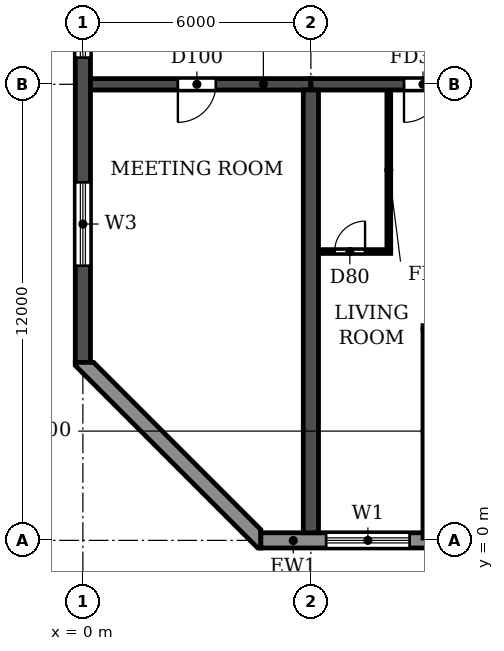
"""IFC4 building model, lengths in metres.
Left out: names, types, materials, properties, quantities, classifications, styles, units other than length and angle.
Written with IfcOpenShell. Run it as: python <this file> out.ifc"""

import sys

from ifc_helpers import new_model, si_unit, direction, frame, frame_2d, origin, place, context, subcontext, project, spatial, polyline, rectangle, outline, extrude, element, fill, save


model = new_model("IFC4")
c1 = context("Model", 3, precision=1e-05, world=origin(), true_north=direction((0.0, 1.0)))
c2 = subcontext(c1, "Body", "Model", "MODEL_VIEW")
j1 = project(units=[si_unit("LENGTHUNIT", "METRE"), si_unit("PLANEANGLEUNIT", "RADIAN")], contexts=[c1])
p1 = place(None, origin())
s1 = spatial("IfcSite", under=j1, at=p1, CompositionType="ELEMENT")
p2 = place(p1, origin())
s2 = spatial("IfcBuilding", under=s1, at=p2, CompositionType="ELEMENT")
p3 = place(p2, frame((0.0, 0.0, 26.7)))
s3 = spatial("IfcBuildingStorey", under=s2, at=p3, CompositionType="ELEMENT", Elevation=26.7)
p4 = place(p3, frame((6.0, 0.2, 0.0), z_axis=(0.0, 0.0, 1.0), x_axis=(0.0, 1.0, 0.0)))
e1 = element("IfcWall", 1, at=p4, inside=s3, PredefinedType="SHEAR", context=c2, shape_type="SweptSolid", body=[
    extrude(rectangle(XDim=11.65, YDim=0.4, at=frame_2d((5.825, 0.0))), origin(), (0.0, 0.0, 1.0), 3.05),
])
p5 = place(p3, frame((0.0, 4.683, 0.0), z_axis=(0.0, 0.0, 1.0), x_axis=(0.0, 1.0, 0.0)))
e2 = element("IfcWall", 2, at=p5, inside=s3, PredefinedType="SHEAR", context=c2, shape_type="SweptSolid", body=[
    extrude(rectangle(XDim=35.434, YDim=0.4, at=frame_2d((17.717, 0.0))), origin(), (0.0, 0.0, 1.0), 3.05),
])
p6 = place(p5, frame((23.817, 0.0, 0.9)))
e3 = element("IfcOpeningElement", 3, at=p6, cuts=e2, PredefinedType="OPENING", context=c2, shape_type="SweptSolid", body=[
    extrude(rectangle(XDim=1.2, YDim=1.5, at=frame_2d((0.6, 0.75))), frame((0.0, 0.21, 0.0), z_axis=(0.0, -1.0, 0.0), x_axis=(1.0, 0.0, 0.0)), (0.0, 0.0, 1.0), 0.42),
])
p7 = place(p5, frame((8.017, 0.0, 0.9)))
e4 = element("IfcOpeningElement", 4, at=p7, cuts=e2, PredefinedType="OPENING", context=c2, shape_type="SweptSolid", body=[
    extrude(rectangle(XDim=1.2, YDim=1.5, at=frame_2d((0.6, 0.75))), frame((0.0, 0.21, 0.0), z_axis=(0.0, -1.0, 0.0), x_axis=(1.0, 0.0, 0.0)), (0.0, 0.0, 1.0), 0.42),
])
p8 = place(p5, frame((15.917, 0.0, 0.9)))
e5 = element("IfcOpeningElement", 5, at=p8, cuts=e2, PredefinedType="OPENING", context=c2, shape_type="SweptSolid", body=[
    extrude(rectangle(XDim=1.2, YDim=1.5, at=frame_2d((0.6, 0.75))), frame((0.0, 0.21, 0.0), z_axis=(0.0, -1.0, 0.0), x_axis=(1.0, 0.0, 0.0)), (0.0, 0.0, 1.0), 0.42),
])
p9 = place(p5, frame((29.493, 0.0, 0.6)))
e6 = element("IfcOpeningElement", 6, at=p9, cuts=e2, PredefinedType="OPENING", context=c2, shape_type="SweptSolid", body=[
    extrude(rectangle(XDim=2.2, YDim=1.8, at=frame_2d((1.1, 0.9))), frame((0.0, 0.21, 0.0), z_axis=(0.0, -1.0, 0.0), x_axis=(1.0, 0.0, 0.0)), (0.0, 0.0, 1.0), 0.42),
])
p10 = place(p5, frame((2.541, 0.0, 0.6)))
e7 = element("IfcOpeningElement", 7, at=p10, cuts=e2, PredefinedType="OPENING", context=c2, shape_type="SweptSolid", body=[
    extrude(rectangle(XDim=2.2, YDim=1.8, at=frame_2d((1.1, 0.9))), frame((0.0, 0.21, 0.0), z_axis=(0.0, -1.0, 0.0), x_axis=(1.0, 0.0, 0.0)), (0.0, 0.0, 1.0), 0.42),
])
p11 = place(p3, frame((0.2, 12.0, 0.0), z_axis=(0.0, 0.0, 1.0), x_axis=(1.0, 0.0, 0.0)))
e8 = element("IfcWall", 8, at=p11, inside=s3, PredefinedType="SHEAR", context=c2, shape_type="SweptSolid", body=[
    extrude(rectangle(XDim=5.8, YDim=0.3, at=frame_2d((2.9, 0.0))), origin(), (0.0, 0.0, 1.0), 2.45),
])
p12 = place(p11, frame((2.3, 0.0, 0.0)))
e9 = element("IfcOpeningElement", 9, at=p12, cuts=e8, PredefinedType="OPENING", context=c2, shape_type="SweptSolid", body=[
    extrude(rectangle(XDim=1.0, YDim=2.1, at=frame_2d((0.5, 1.05))), frame((0.0, 0.16, 0.0), z_axis=(0.0, -1.0, 0.0), x_axis=(1.0, 0.0, 0.0)), (0.0, 0.0, 1.0), 0.32),
])
p13 = place(p3, frame((6.0, 12.0, 0.0), z_axis=(0.0, 0.0, 1.0), x_axis=(1.0, 0.0, 0.0)))
e10 = element("IfcWall", 10, at=p13, inside=s3, PredefinedType="SHEAR", context=c2, shape_type="SweptSolid", body=[
    extrude(rectangle(XDim=6.0, YDim=0.3, at=frame_2d((3.0, 0.0))), origin(), (0.0, 0.0, 1.0), 2.45),
])
p14 = place(p13, frame((2.45, 0.0, 0.0)))
e11 = element("IfcOpeningElement", 11, at=p14, cuts=e10, PredefinedType="OPENING", context=c2, shape_type="SweptSolid", body=[
    extrude(rectangle(XDim=1.0, YDim=2.1, at=frame_2d((0.5, 1.05))), frame((0.0, 0.16, 0.0), z_axis=(0.0, -1.0, 0.0), x_axis=(1.0, 0.0, 0.0)), (0.0, 0.0, 1.0), 0.32),
])
p15 = place(p3, frame((4.683, 0.0, 0.0), z_axis=(0.0, 0.0, 1.0), x_axis=(1.0, 0.0, 0.0)))
e12 = element("IfcWall", 12, at=p15, inside=s3, PredefinedType="STANDARD", context=c2, shape_type="SweptSolid", body=[
    extrude(rectangle(XDim=92.634, YDim=0.4, at=frame_2d((46.317, 0.0))), origin(), (0.0, 0.0, 1.0), 3.05),
])
p16 = place(p15, frame((1.717, 0.0, 0.9)))
e13 = element("IfcOpeningElement", 13, at=p16, cuts=e12, PredefinedType="OPENING", context=c2, shape_type="SweptSolid", body=[
    extrude(rectangle(XDim=2.2, YDim=1.5, at=frame_2d((1.1, 0.75))), frame((0.0, 0.21, 0.0), z_axis=(0.0, -1.0, 0.0), x_axis=(1.0, 0.0, 0.0)), (0.0, 0.0, 1.0), 0.42),
])
p17 = place(p15, frame((4.717, 0.0, 0.9)))
e14 = element("IfcOpeningElement", 14, at=p17, cuts=e12, PredefinedType="OPENING", context=c2, shape_type="SweptSolid", body=[
    extrude(rectangle(XDim=2.2, YDim=1.5, at=frame_2d((1.1, 0.75))), frame((0.0, 0.21, 0.0), z_axis=(0.0, -1.0, 0.0), x_axis=(1.0, 0.0, 0.0)), (0.0, 0.0, 1.0), 0.42),
])
p18 = place(p15, frame((7.717, 0.0, 0.9)))
e15 = element("IfcOpeningElement", 15, at=p18, cuts=e12, PredefinedType="OPENING", context=c2, shape_type="SweptSolid", body=[
    extrude(rectangle(XDim=2.2, YDim=1.5, at=frame_2d((1.1, 0.75))), frame((0.0, 0.21, 0.0), z_axis=(0.0, -1.0, 0.0), x_axis=(1.0, 0.0, 0.0)), (0.0, 0.0, 1.0), 0.42),
])
p19 = place(p15, frame((10.717, 0.0, 0.9)))
e16 = element("IfcOpeningElement", 16, at=p19, cuts=e12, PredefinedType="OPENING", context=c2, shape_type="SweptSolid", body=[
    extrude(rectangle(XDim=2.2, YDim=1.5, at=frame_2d((1.1, 0.75))), frame((0.0, 0.21, 0.0), z_axis=(0.0, -1.0, 0.0), x_axis=(1.0, 0.0, 0.0)), (0.0, 0.0, 1.0), 0.42),
])
p20 = place(p15, frame((13.717, 0.0, 0.9)))
e17 = element("IfcOpeningElement", 17, at=p20, cuts=e12, PredefinedType="OPENING", context=c2, shape_type="SweptSolid", body=[
    extrude(rectangle(XDim=2.2, YDim=1.5, at=frame_2d((1.1, 0.75))), frame((0.0, 0.21, 0.0), z_axis=(0.0, -1.0, 0.0), x_axis=(1.0, 0.0, 0.0)), (0.0, 0.0, 1.0), 0.42),
])
p21 = place(p15, frame((16.717, 0.0, 0.9)))
e18 = element("IfcOpeningElement", 18, at=p21, cuts=e12, PredefinedType="OPENING", context=c2, shape_type="SweptSolid", body=[
    extrude(rectangle(XDim=2.2, YDim=1.5, at=frame_2d((1.1, 0.75))), frame((0.0, 0.21, 0.0), z_axis=(0.0, -1.0, 0.0), x_axis=(1.0, 0.0, 0.0)), (0.0, 0.0, 1.0), 0.42),
])
p22 = place(p15, frame((19.917, 0.0, 0.0)))
e19 = element("IfcOpeningElement", 19, at=p22, cuts=e12, PredefinedType="OPENING", context=c2, shape_type="SweptSolid", body=[
    extrude(rectangle(XDim=1.8, YDim=2.4, at=frame_2d((0.9, 1.2))), frame((0.0, 0.21, 0.0), z_axis=(0.0, -1.0, 0.0), x_axis=(1.0, 0.0, 0.0)), (0.0, 0.0, 1.0), 0.42),
])
p23 = place(p15, frame((22.717, 0.0, 0.9)))
e20 = element("IfcOpeningElement", 20, at=p23, cuts=e12, PredefinedType="OPENING", context=c2, shape_type="SweptSolid", body=[
    extrude(rectangle(XDim=2.2, YDim=1.5, at=frame_2d((1.1, 0.75))), frame((0.0, 0.21, 0.0), z_axis=(0.0, -1.0, 0.0), x_axis=(1.0, 0.0, 0.0)), (0.0, 0.0, 1.0), 0.42),
])
p24 = place(p15, frame((25.717, 0.0, 0.9)))
e21 = element("IfcOpeningElement", 21, at=p24, cuts=e12, PredefinedType="OPENING", context=c2, shape_type="SweptSolid", body=[
    extrude(rectangle(XDim=2.2, YDim=1.5, at=frame_2d((1.1, 0.75))), frame((0.0, 0.21, 0.0), z_axis=(0.0, -1.0, 0.0), x_axis=(1.0, 0.0, 0.0)), (0.0, 0.0, 1.0), 0.42),
])
p25 = place(p15, frame((28.717, 0.0, 0.9)))
e22 = element("IfcOpeningElement", 22, at=p25, cuts=e12, PredefinedType="OPENING", context=c2, shape_type="SweptSolid", body=[
    extrude(rectangle(XDim=2.2, YDim=1.5, at=frame_2d((1.1, 0.75))), frame((0.0, 0.21, 0.0), z_axis=(0.0, -1.0, 0.0), x_axis=(1.0, 0.0, 0.0)), (0.0, 0.0, 1.0), 0.42),
])
p26 = place(p15, frame((31.917, 0.0, 0.0)))
e23 = element("IfcOpeningElement", 23, at=p26, cuts=e12, PredefinedType="OPENING", context=c2, shape_type="SweptSolid", body=[
    extrude(rectangle(XDim=1.8, YDim=2.4, at=frame_2d((0.9, 1.2))), frame((0.0, 0.21, 0.0), z_axis=(0.0, -1.0, 0.0), x_axis=(1.0, 0.0, 0.0)), (0.0, 0.0, 1.0), 0.42),
])
p27 = place(p15, frame((34.717, 0.0, 0.9)))
e24 = element("IfcOpeningElement", 24, at=p27, cuts=e12, PredefinedType="OPENING", context=c2, shape_type="SweptSolid", body=[
    extrude(rectangle(XDim=2.2, YDim=1.5, at=frame_2d((1.1, 0.75))), frame((0.0, 0.21, 0.0), z_axis=(0.0, -1.0, 0.0), x_axis=(1.0, 0.0, 0.0)), (0.0, 0.0, 1.0), 0.42),
])
p28 = place(p15, frame((37.717, 0.0, 0.9)))
e25 = element("IfcOpeningElement", 25, at=p28, cuts=e12, PredefinedType="OPENING", context=c2, shape_type="SweptSolid", body=[
    extrude(rectangle(XDim=2.2, YDim=1.5, at=frame_2d((1.1, 0.75))), frame((0.0, 0.21, 0.0), z_axis=(0.0, -1.0, 0.0), x_axis=(1.0, 0.0, 0.0)), (0.0, 0.0, 1.0), 0.42),
])
p29 = place(p15, frame((40.717, 0.0, 0.9)))
e26 = element("IfcOpeningElement", 26, at=p29, cuts=e12, PredefinedType="OPENING", context=c2, shape_type="SweptSolid", body=[
    extrude(rectangle(XDim=2.2, YDim=1.5, at=frame_2d((1.1, 0.75))), frame((0.0, 0.21, 0.0), z_axis=(0.0, -1.0, 0.0), x_axis=(1.0, 0.0, 0.0)), (0.0, 0.0, 1.0), 0.42),
])
p30 = place(p15, frame((43.917, 0.0, 0.0)))
e27 = element("IfcOpeningElement", 27, at=p30, cuts=e12, PredefinedType="OPENING", context=c2, shape_type="SweptSolid", body=[
    extrude(rectangle(XDim=1.8, YDim=2.4, at=frame_2d((0.9, 1.2))), frame((0.0, 0.21, 0.0), z_axis=(0.0, -1.0, 0.0), x_axis=(1.0, 0.0, 0.0)), (0.0, 0.0, 1.0), 0.42),
])
p31 = place(p15, frame((46.717, 0.0, 0.9)))
e28 = element("IfcOpeningElement", 28, at=p31, cuts=e12, PredefinedType="OPENING", context=c2, shape_type="SweptSolid", body=[
    extrude(rectangle(XDim=2.2, YDim=1.5, at=frame_2d((1.1, 0.75))), frame((0.0, 0.21, 0.0), z_axis=(0.0, -1.0, 0.0), x_axis=(1.0, 0.0, 0.0)), (0.0, 0.0, 1.0), 0.42),
])
p32 = place(p15, frame((49.717, 0.0, 0.9)))
e29 = element("IfcOpeningElement", 29, at=p32, cuts=e12, PredefinedType="OPENING", context=c2, shape_type="SweptSolid", body=[
    extrude(rectangle(XDim=2.2, YDim=1.5, at=frame_2d((1.1, 0.75))), frame((0.0, 0.21, 0.0), z_axis=(0.0, -1.0, 0.0), x_axis=(1.0, 0.0, 0.0)), (0.0, 0.0, 1.0), 0.42),
])
p33 = place(p15, frame((52.717, 0.0, 0.9)))
e30 = element("IfcOpeningElement", 30, at=p33, cuts=e12, PredefinedType="OPENING", context=c2, shape_type="SweptSolid", body=[
    extrude(rectangle(XDim=2.2, YDim=1.5, at=frame_2d((1.1, 0.75))), frame((0.0, 0.21, 0.0), z_axis=(0.0, -1.0, 0.0), x_axis=(1.0, 0.0, 0.0)), (0.0, 0.0, 1.0), 0.42),
])
p34 = place(p15, frame((55.717, 0.0, 0.9)))
e31 = element("IfcOpeningElement", 31, at=p34, cuts=e12, PredefinedType="OPENING", context=c2, shape_type="SweptSolid", body=[
    extrude(rectangle(XDim=2.2, YDim=1.5, at=frame_2d((1.1, 0.75))), frame((0.0, 0.21, 0.0), z_axis=(0.0, -1.0, 0.0), x_axis=(1.0, 0.0, 0.0)), (0.0, 0.0, 1.0), 0.42),
])
p35 = place(p15, frame((58.917, 0.0, 0.0)))
e32 = element("IfcOpeningElement", 32, at=p35, cuts=e12, PredefinedType="OPENING", context=c2, shape_type="SweptSolid", body=[
    extrude(rectangle(XDim=1.8, YDim=2.4, at=frame_2d((0.9, 1.2))), frame((0.0, 0.21, 0.0), z_axis=(0.0, -1.0, 0.0), x_axis=(1.0, 0.0, 0.0)), (0.0, 0.0, 1.0), 0.42),
])
p36 = place(p15, frame((61.717, 0.0, 0.9)))
e33 = element("IfcOpeningElement", 33, at=p36, cuts=e12, PredefinedType="OPENING", context=c2, shape_type="SweptSolid", body=[
    extrude(rectangle(XDim=2.2, YDim=1.5, at=frame_2d((1.1, 0.75))), frame((0.0, 0.21, 0.0), z_axis=(0.0, -1.0, 0.0), x_axis=(1.0, 0.0, 0.0)), (0.0, 0.0, 1.0), 0.42),
])
p37 = place(p15, frame((64.717, 0.0, 0.9)))
e34 = element("IfcOpeningElement", 34, at=p37, cuts=e12, PredefinedType="OPENING", context=c2, shape_type="SweptSolid", body=[
    extrude(rectangle(XDim=2.2, YDim=1.5, at=frame_2d((1.1, 0.75))), frame((0.0, 0.21, 0.0), z_axis=(0.0, -1.0, 0.0), x_axis=(1.0, 0.0, 0.0)), (0.0, 0.0, 1.0), 0.42),
])
p38 = place(p15, frame((67.717, 0.0, 0.9)))
e35 = element("IfcOpeningElement", 35, at=p38, cuts=e12, PredefinedType="OPENING", context=c2, shape_type="SweptSolid", body=[
    extrude(rectangle(XDim=2.2, YDim=1.5, at=frame_2d((1.1, 0.75))), frame((0.0, 0.21, 0.0), z_axis=(0.0, -1.0, 0.0), x_axis=(1.0, 0.0, 0.0)), (0.0, 0.0, 1.0), 0.42),
])
p39 = place(p15, frame((70.917, 0.0, 0.0)))
e36 = element("IfcOpeningElement", 36, at=p39, cuts=e12, PredefinedType="OPENING", context=c2, shape_type="SweptSolid", body=[
    extrude(rectangle(XDim=1.8, YDim=2.4, at=frame_2d((0.9, 1.2))), frame((0.0, 0.21, 0.0), z_axis=(0.0, -1.0, 0.0), x_axis=(1.0, 0.0, 0.0)), (0.0, 0.0, 1.0), 0.42),
])
p40 = place(p15, frame((73.717, 0.0, 0.9)))
e37 = element("IfcOpeningElement", 37, at=p40, cuts=e12, PredefinedType="OPENING", context=c2, shape_type="SweptSolid", body=[
    extrude(rectangle(XDim=2.2, YDim=1.5, at=frame_2d((1.1, 0.75))), frame((0.0, 0.21, 0.0), z_axis=(0.0, -1.0, 0.0), x_axis=(1.0, 0.0, 0.0)), (0.0, 0.0, 1.0), 0.42),
])
p41 = place(p15, frame((76.717, 0.0, 0.9)))
e38 = element("IfcOpeningElement", 38, at=p41, cuts=e12, PredefinedType="OPENING", context=c2, shape_type="SweptSolid", body=[
    extrude(rectangle(XDim=2.2, YDim=1.5, at=frame_2d((1.1, 0.75))), frame((0.0, 0.21, 0.0), z_axis=(0.0, -1.0, 0.0), x_axis=(1.0, 0.0, 0.0)), (0.0, 0.0, 1.0), 0.42),
])
p42 = place(p15, frame((79.717, 0.0, 0.9)))
e39 = element("IfcOpeningElement", 39, at=p42, cuts=e12, PredefinedType="OPENING", context=c2, shape_type="SweptSolid", body=[
    extrude(rectangle(XDim=2.2, YDim=1.5, at=frame_2d((1.1, 0.75))), frame((0.0, 0.21, 0.0), z_axis=(0.0, -1.0, 0.0), x_axis=(1.0, 0.0, 0.0)), (0.0, 0.0, 1.0), 0.42),
])
p43 = place(p15, frame((82.717, 0.0, 0.9)))
e40 = element("IfcOpeningElement", 40, at=p43, cuts=e12, PredefinedType="OPENING", context=c2, shape_type="SweptSolid", body=[
    extrude(rectangle(XDim=2.2, YDim=1.5, at=frame_2d((1.1, 0.75))), frame((0.0, 0.21, 0.0), z_axis=(0.0, -1.0, 0.0), x_axis=(1.0, 0.0, 0.0)), (0.0, 0.0, 1.0), 0.42),
])
p44 = place(p15, frame((85.717, 0.0, 0.9)))
e41 = element("IfcOpeningElement", 41, at=p44, cuts=e12, PredefinedType="OPENING", context=c2, shape_type="SweptSolid", body=[
    extrude(rectangle(XDim=2.2, YDim=1.5, at=frame_2d((1.1, 0.75))), frame((0.0, 0.21, 0.0), z_axis=(0.0, -1.0, 0.0), x_axis=(1.0, 0.0, 0.0)), (0.0, 0.0, 1.0), 0.42),
])
p45 = place(p15, frame((88.717, 0.0, 0.9)))
e42 = element("IfcOpeningElement", 42, at=p45, cuts=e12, PredefinedType="OPENING", context=c2, shape_type="SweptSolid", body=[
    extrude(rectangle(XDim=2.2, YDim=1.5, at=frame_2d((1.1, 0.75))), frame((0.0, 0.21, 0.0), z_axis=(0.0, -1.0, 0.0), x_axis=(1.0, 0.0, 0.0)), (0.0, 0.0, 1.0), 0.42),
])
p46 = place(p3, origin())
e43 = element("IfcWall", 43, at=p46, inside=s3, PredefinedType="STANDARD", context=c2, shape_type="SweptSolid", body=[
    extrude(outline(polyline([(-0.2, 4.683), (-0.2, 4.6), (4.6, -0.2), (4.683, -0.2), (4.683, 0.283), (0.283, 4.683), (-0.2, 4.683)])), origin(), (0.0, 0.0, 1.0), 3.05),
])
p47 = place(p3, frame((8.95, 5.6, 0.0), z_axis=(0.0, 0.0, 1.0), x_axis=(1.0, 0.0, 0.0)))
e44 = element("IfcWall", 44, at=p47, inside=s3, PredefinedType="PARTITIONING", context=c2, shape_type="SweptSolid", body=[
    extrude(rectangle(XDim=2.84, YDim=0.1, at=frame_2d((1.42, 0.0))), origin(), (0.0, 0.0, 1.0), 3.05),
])
p48 = place(p47, frame((0.55, 0.0, 0.0)))
e45 = element("IfcOpeningElement", 45, at=p48, cuts=e44, PredefinedType="OPENING", context=c2, shape_type="SweptSolid", body=[
    extrude(rectangle(XDim=0.9, YDim=2.1, at=frame_2d((0.45, 1.05))), frame((0.0, 0.06, 0.0), z_axis=(0.0, -1.0, 0.0), x_axis=(1.0, 0.0, 0.0)), (0.0, 0.0, 1.0), 0.12),
])
p49 = place(p3, frame((6.21, 7.6, 0.0), z_axis=(0.0, 0.0, 1.0), x_axis=(1.0, 0.0, 0.0)))
e46 = element("IfcWall", 46, at=p49, inside=s3, PredefinedType="PARTITIONING", context=c2, shape_type="SweptSolid", body=[
    extrude(rectangle(XDim=1.89, YDim=0.1, at=frame_2d((0.945, 0.0))), origin(), (0.0, 0.0, 1.0), 3.05),
])
p50 = place(p49, frame((0.415, 0.0, 0.0)))
e47 = element("IfcOpeningElement", 47, at=p50, cuts=e46, PredefinedType="OPENING", context=c2, shape_type="SweptSolid", body=[
    extrude(rectangle(XDim=0.8, YDim=2.1, at=frame_2d((0.4, 1.05))), frame((0.0, 0.06, 0.0), z_axis=(0.0, -1.0, 0.0), x_axis=(1.0, 0.0, 0.0)), (0.0, 0.0, 1.0), 0.12),
])
p51 = place(p3, frame((8.05, 7.65, 0.0), z_axis=(0.0, 0.0, 1.0), x_axis=(0.0, 1.0, 0.0)))
e48 = element("IfcWall", 48, at=p51, inside=s3, PredefinedType="PARTITIONING", context=c2, shape_type="SweptSolid", body=[
    extrude(rectangle(XDim=4.19, YDim=0.1, at=frame_2d((2.095, 0.0))), origin(), (0.0, 0.0, 1.0), 3.05),
])
p52 = place(p3, frame((9.0, 0.06, 0.0), z_axis=(0.0, 0.0, 1.0), x_axis=(0.0, 1.0, 0.0)))
e49 = element("IfcWall", 49, at=p52, inside=s3, PredefinedType="PARTITIONING", context=c2, shape_type="SweptSolid", body=[
    extrude(rectangle(XDim=5.49, YDim=0.1, at=frame_2d((2.745, 0.0))), origin(), (0.0, 0.0, 1.0), 3.05),
])
p53 = place(p16, origin())
e50 = element("IfcWindow", 50, at=p53, inside=s3, PartitioningType="DOUBLE_PANEL_HORIZONTAL", PredefinedType="WINDOW", context=c2, shape_type="SweptSolid", body=[
    extrude(rectangle(XDim=2.2, YDim=1.5, at=frame_2d((1.1, 0.75))), frame((0.0, 0.03, 0.0), z_axis=(0.0, -1.0, 0.0), x_axis=(1.0, 0.0, 0.0)), (0.0, 0.0, 1.0), 0.06),
])
fill(e13, e50)
p54 = place(p7, origin())
e51 = element("IfcWindow", 51, at=p54, inside=s3, PartitioningType="SINGLE_PANEL", PredefinedType="WINDOW", context=c2, shape_type="SweptSolid", body=[
    extrude(rectangle(XDim=1.2, YDim=1.5, at=frame_2d((0.6, 0.75))), frame((0.0, 0.03, 0.0), z_axis=(0.0, -1.0, 0.0), x_axis=(1.0, 0.0, 0.0)), (0.0, 0.0, 1.0), 0.06),
])
fill(e4, e51)
p55 = place(p10, origin())
e52 = element("IfcWindow", 52, at=p55, inside=s3, PartitioningType="DOUBLE_PANEL_HORIZONTAL", PredefinedType="WINDOW", context=c2, shape_type="SweptSolid", body=[
    extrude(rectangle(XDim=2.2, YDim=1.8, at=frame_2d((1.1, 0.9))), frame((0.0, 0.03, 0.0), z_axis=(0.0, -1.0, 0.0), x_axis=(1.0, 0.0, 0.0)), (0.0, 0.0, 1.0), 0.06),
])
fill(e7, e52)
p56 = place(p12, frame((1.0, 0.0, 0.0), z_axis=(0.0, 0.0, 1.0), x_axis=(-1.0, 0.0, 0.0)))
e53 = element("IfcDoor", 53, at=p56, inside=s3, OperationType="SINGLE_SWING_RIGHT", PredefinedType="DOOR", context=c2, shape_type="SweptSolid", body=[
    extrude(rectangle(XDim=1.0, YDim=2.1, at=frame_2d((0.5, 1.05))), frame((0.0, 0.025, 0.0), z_axis=(0.0, -1.0, 0.0), x_axis=(1.0, 0.0, 0.0)), (0.0, 0.0, 1.0), 0.05),
])
fill(e9, e53)
p57 = place(p50, origin())
e54 = element("IfcDoor", 54, at=p57, inside=s3, OperationType="SINGLE_SWING_RIGHT", PredefinedType="DOOR", context=c2, shape_type="SweptSolid", body=[
    extrude(rectangle(XDim=0.8, YDim=2.1, at=frame_2d((0.4, 1.05))), frame((0.0, 0.025, 0.0), z_axis=(0.0, -1.0, 0.0), x_axis=(1.0, 0.0, 0.0)), (0.0, 0.0, 1.0), 0.05),
])
fill(e47, e54)
p58 = place(p14, frame((1.0, 0.0, 0.0), z_axis=(0.0, 0.0, 1.0), x_axis=(-1.0, 0.0, 0.0)))
e55 = element("IfcDoor", 55, at=p58, inside=s3, OperationType="SINGLE_SWING_RIGHT", PredefinedType="DOOR", context=c2, shape_type="SweptSolid", body=[
    extrude(rectangle(XDim=1.0, YDim=2.1, at=frame_2d((0.5, 1.05))), frame((0.0, 0.025, 0.0), z_axis=(0.0, -1.0, 0.0), x_axis=(1.0, 0.0, 0.0)), (0.0, 0.0, 1.0), 0.05),
])
fill(e11, e55)
save(model, sys.argv[1])
